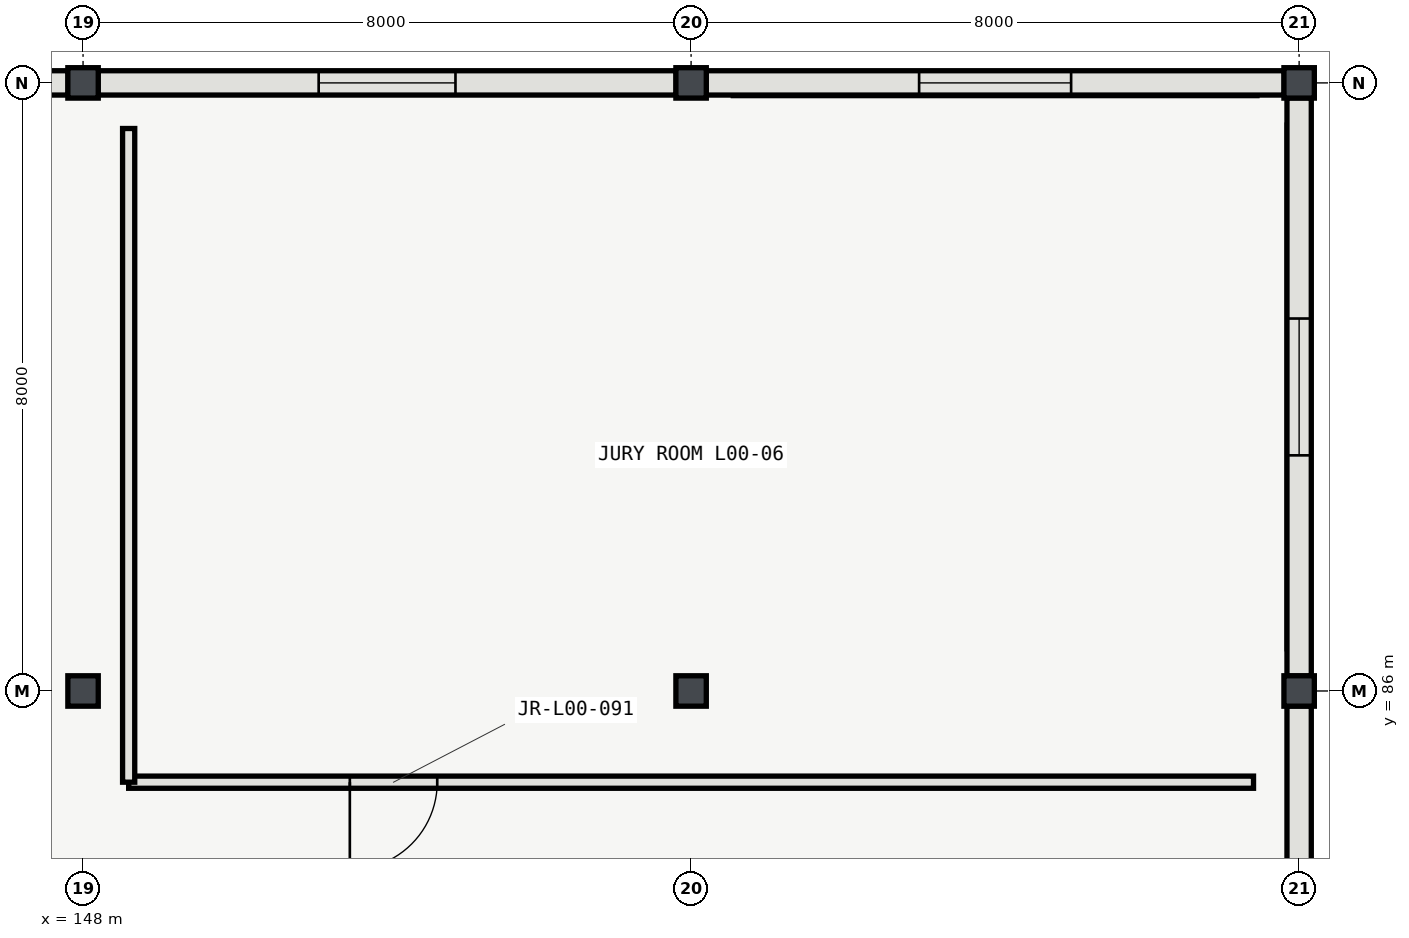
"""IFC4 building model, lengths in metres.
Left out: names, types, materials, properties, quantities, classifications, styles, units other than length and angle.
Written with IfcOpenShell. Run it as: python <this file> out.ifc"""

import sys

from ifc_helpers import new_model, si_unit, direction, frame, frame_2d, origin, origin_2d, place, context, subcontext, project, spatial, rectangle, i_section, extrude, element, fill, save


model = new_model("IFC4")
c1 = context("Model", 3, precision=1e-05, world=origin(), true_north=direction((0.0, 1.0)))
c2 = subcontext(c1, "Body", "Model", "MODEL_VIEW")
j1 = project(units=[si_unit("LENGTHUNIT", "METRE"), si_unit("PLANEANGLEUNIT", "RADIAN")], contexts=[c1])
p1 = place(None, origin())
s1 = spatial("IfcSite", under=j1, at=p1, CompositionType="ELEMENT")
p2 = place(p1, origin())
s2 = spatial("IfcBuilding", under=s1, at=p2, CompositionType="ELEMENT")
p3 = place(p2, origin())
s3 = spatial("IfcBuildingStorey", under=s2, at=p3, CompositionType="ELEMENT", Elevation=0.0)
for number, where, z_axis, x_axis in (
    (1, (148.0, 86.0, 0.0), (0.0, 0.0, 1.0), (1.0, 0.0, 0.0)),
    (2, (148.0, 94.0, 0.0), (0.0, 0.0, 1.0), (1.0, 0.0, 0.0)),
    (3, (156.0, 86.0, 0.0), (0.0, 0.0, 1.0), (1.0, 0.0, 0.0)),
    (4, (156.0, 94.0, 0.0), (0.0, 0.0, 1.0), (1.0, 0.0, 0.0)),
    (5, (164.0, 86.0, 0.0), (0.0, 0.0, 1.0), (1.0, 0.0, 0.0)),
    (6, (164.0, 94.0, 0.0), (0.0, 0.0, 1.0), (1.0, 0.0, 0.0)),
):
    element("IfcColumn", number, at=place(p3, frame(where, z_axis=z_axis, x_axis=x_axis)), inside=s3, PredefinedType="COLUMN", context=c2, shape_type="SweptSolid", body=[
        extrude(i_section(OverallWidth=0.4, OverallDepth=0.4, WebThickness=0.013, FlangeThickness=0.021, FilletRadius=0.022, at=origin_2d()), origin(), (0.0, 0.0, 1.0), 5.4),
    ])
p4 = place(p3, frame((147.804, 94.0, 0.0), z_axis=(0.0, 0.0, 1.0), x_axis=(-1.0, 0.0, 0.0)))
e7 = element("IfcWall", 7, at=p4, inside=s3, PredefinedType="SOLIDWALL", context=c2, shape_type="SweptSolid", body=[
    extrude(rectangle(XDim=7.608, YDim=0.32, at=frame_2d((3.804, 0.0))), origin(), (0.0, 0.0, 1.0), 4.663),
])
p5 = place(p4, frame((2.979, 0.0, 0.95)))
e8 = element("IfcOpeningElement", 8, at=p5, cuts=e7, PredefinedType="OPENING", context=c2, shape_type="SweptSolid", body=[
    extrude(rectangle(XDim=1.65, YDim=1.8, at=frame_2d((0.825, 0.9))), frame((0.0, 0.17, 0.0), z_axis=(0.0, -1.0, 0.0), x_axis=(1.0, 0.0, 0.0)), (0.0, 0.0, 1.0), 0.34),
])
p6 = place(p3, frame((155.804, 94.0, 0.0), z_axis=(0.0, 0.0, 1.0), x_axis=(-1.0, 0.0, 0.0)))
e9 = element("IfcWall", 9, at=p6, inside=s3, PredefinedType="SOLIDWALL", context=c2, shape_type="SweptSolid", body=[
    extrude(rectangle(XDim=7.608, YDim=0.32, at=frame_2d((3.804, 0.0))), origin(), (0.0, 0.0, 1.0), 4.663),
])
p7 = place(p6, frame((2.904, 0.0, 0.95)))
e10 = element("IfcOpeningElement", 10, at=p7, cuts=e9, PredefinedType="OPENING", context=c2, shape_type="SweptSolid", body=[
    extrude(rectangle(XDim=1.8, YDim=1.8, at=frame_2d((0.9, 0.9))), frame((0.0, 0.17, 0.0), z_axis=(0.0, -1.0, 0.0), x_axis=(1.0, 0.0, 0.0)), (0.0, 0.0, 1.0), 0.34),
])
p8 = place(p3, frame((163.804, 94.0, 0.0), z_axis=(0.0, 0.0, 1.0), x_axis=(-1.0, 0.0, 0.0)))
e11 = element("IfcWall", 11, at=p8, inside=s3, PredefinedType="SOLIDWALL", context=c2, shape_type="SweptSolid", body=[
    extrude(rectangle(XDim=7.608, YDim=0.32, at=frame_2d((3.804, 0.0))), origin(), (0.0, 0.0, 1.0), 4.663),
])
p9 = place(p8, frame((2.804, 0.0, 0.95)))
e12 = element("IfcOpeningElement", 12, at=p9, cuts=e11, PredefinedType="OPENING", context=c2, shape_type="SweptSolid", body=[
    extrude(rectangle(XDim=2.0, YDim=1.8, at=frame_2d((1.0, 0.9))), frame((0.0, 0.17, 0.0), z_axis=(0.0, -1.0, 0.0), x_axis=(1.0, 0.0, 0.0)), (0.0, 0.0, 1.0), 0.34),
])
p10 = place(p3, frame((164.0, 78.196, 0.0), z_axis=(0.0, 0.0, 1.0), x_axis=(0.0, 1.0, 0.0)))
e13 = element("IfcWall", 13, at=p10, inside=s3, PredefinedType="SOLIDWALL", context=c2, shape_type="SweptSolid", body=[
    extrude(rectangle(XDim=7.608, YDim=0.32, at=frame_2d((3.804, 0.0))), origin(), (0.0, 0.0, 1.0), 4.503),
])
p11 = place(p3, frame((164.0, 86.196, 0.0), z_axis=(0.0, 0.0, 1.0), x_axis=(0.0, 1.0, 0.0)))
e14 = element("IfcWall", 14, at=p11, inside=s3, PredefinedType="SOLIDWALL", context=c2, shape_type="SweptSolid", body=[
    extrude(rectangle(XDim=7.608, YDim=0.32, at=frame_2d((3.804, 0.0))), origin(), (0.0, 0.0, 1.0), 4.503),
])
p12 = place(p11, frame((2.904, 0.0, 0.95)))
e15 = element("IfcOpeningElement", 15, at=p12, cuts=e14, PredefinedType="OPENING", context=c2, shape_type="SweptSolid", body=[
    extrude(rectangle(XDim=1.8, YDim=2.1, at=frame_2d((0.9, 1.05))), frame((0.0, 0.17, 0.0), z_axis=(0.0, -1.0, 0.0), x_axis=(1.0, 0.0, 0.0)), (0.0, 0.0, 1.0), 0.34),
])
p13 = place(p3, frame((148.6, 84.8, 0.0), z_axis=(0.0, 0.0, 1.0), x_axis=(1.0, 0.0, 0.0)))
e16 = element("IfcWall", 16, at=p13, inside=s3, PredefinedType="PARTITIONING", context=c2, shape_type="SweptSolid", body=[
    extrude(rectangle(XDim=14.8, YDim=0.16, at=frame_2d((7.4, 0.0))), origin(), (0.0, 0.0, 1.0), 5.12),
])
p14 = place(p13, frame((2.91, 0.0, 0.0)))
e17 = element("IfcOpeningElement", 17, at=p14, cuts=e16, PredefinedType="OPENING", context=c2, shape_type="SweptSolid", body=[
    extrude(rectangle(XDim=1.15, YDim=2.2, at=frame_2d((0.575, 1.1))), frame((0.0, 0.09, 0.0), z_axis=(0.0, -1.0, 0.0), x_axis=(1.0, 0.0, 0.0)), (0.0, 0.0, 1.0), 0.18),
])
p15 = place(p3, frame((148.6, 93.4, 0.0), z_axis=(0.0, 0.0, 1.0), x_axis=(0.0, -1.0, 0.0)))
e18 = element("IfcWall", 18, at=p15, inside=s3, PredefinedType="PARTITIONING", context=c2, shape_type="SweptSolid", body=[
    extrude(rectangle(XDim=8.6, YDim=0.16, at=frame_2d((4.3, 0.0))), origin(), (0.0, 0.0, 1.0), 5.12),
])
p16 = place(p7, origin())
e19 = element("IfcWindow", 19, at=p16, inside=s3, PartitioningType="SINGLE_PANEL", PredefinedType="WINDOW", context=c2, shape_type="SweptSolid", body=[
    extrude(rectangle(XDim=1.8, YDim=1.8, at=frame_2d((0.9, 0.9))), frame((0.0, 0.03, 0.0), z_axis=(0.0, -1.0, 0.0), x_axis=(1.0, 0.0, 0.0)), (0.0, 0.0, 1.0), 0.06),
])
fill(e10, e19)
p17 = place(p9, origin())
e20 = element("IfcWindow", 20, at=p17, inside=s3, PartitioningType="SINGLE_PANEL", PredefinedType="WINDOW", context=c2, shape_type="SweptSolid", body=[
    extrude(rectangle(XDim=2.0, YDim=1.8, at=frame_2d((1.0, 0.9))), frame((0.0, 0.03, 0.0), z_axis=(0.0, -1.0, 0.0), x_axis=(1.0, 0.0, 0.0)), (0.0, 0.0, 1.0), 0.06),
])
fill(e12, e20)
p18 = place(p12, origin())
e21 = element("IfcWindow", 21, at=p18, inside=s3, PartitioningType="SINGLE_PANEL", PredefinedType="WINDOW", context=c2, shape_type="SweptSolid", body=[
    extrude(rectangle(XDim=1.8, YDim=2.1, at=frame_2d((0.9, 1.05))), frame((0.0, 0.03, 0.0), z_axis=(0.0, -1.0, 0.0), x_axis=(1.0, 0.0, 0.0)), (0.0, 0.0, 1.0), 0.06),
])
fill(e15, e21)
p19 = place(p14, origin())
e22 = element("IfcDoor", 22, at=p19, inside=s3, OperationType="SINGLE_SWING_LEFT", PredefinedType="DOOR", context=c2, shape_type="SweptSolid", body=[
    extrude(rectangle(XDim=1.15, YDim=2.2, at=frame_2d((0.575, 1.1))), frame((0.0, 0.025, 0.0), z_axis=(0.0, -1.0, 0.0), x_axis=(1.0, 0.0, 0.0)), (0.0, 0.0, 1.0), 0.05),
])
fill(e17, e22)
save(model, sys.argv[1])
